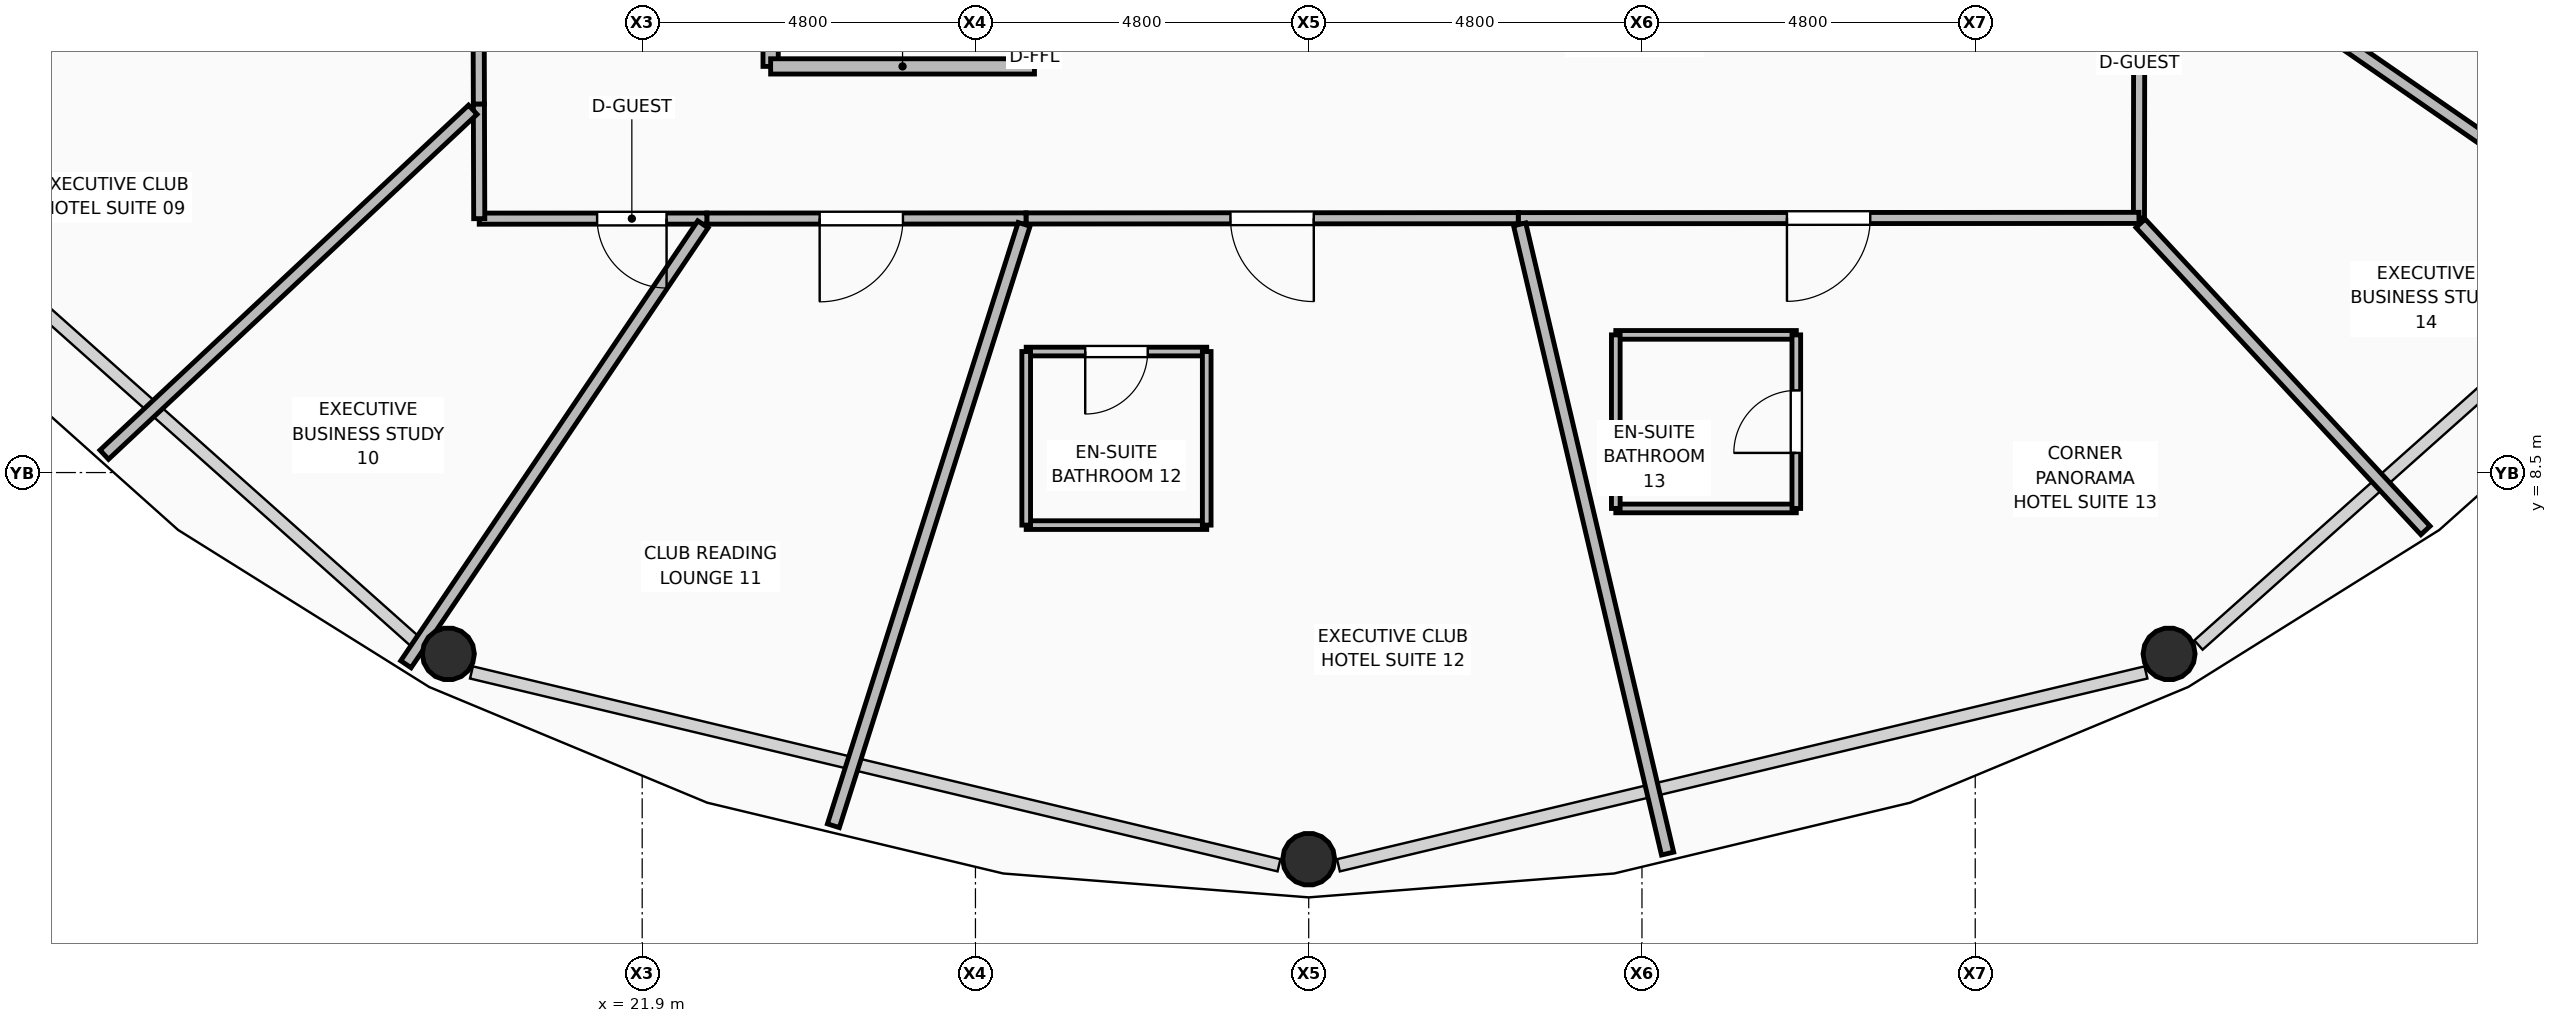
"""IFC4 building model, lengths in metres.
Left out: names, types, materials, properties, quantities, classifications, styles, units other than length and angle.
Written with IfcOpenShell. Run it as: python <this file> out.ifc"""

import sys

from ifc_helpers import new_model, si_unit, direction, frame, frame_2d, origin, origin_2d, place, context, subcontext, project, spatial, rectangle, hollow_circle, extrude, element, fill, save


model = new_model("IFC4")
c1 = context("Model", 3, precision=1e-05, world=origin(), true_north=direction((0.0, 1.0)))
c2 = subcontext(c1, "Body", "Model", "MODEL_VIEW")
j1 = project(units=[si_unit("LENGTHUNIT", "METRE"), si_unit("PLANEANGLEUNIT", "RADIAN")], contexts=[c1])
p1 = place(None, origin())
s1 = spatial("IfcSite", under=j1, at=p1, CompositionType="ELEMENT")
p2 = place(p1, origin())
s2 = spatial("IfcBuilding", under=s1, at=p2, CompositionType="ELEMENT")
p3 = place(p2, frame((0.0, 0.0, 149.7)))
s3 = spatial("IfcBuildingStorey", under=s2, at=p3, CompositionType="ELEMENT", Elevation=149.7)
for number, where, z_axis, x_axis in (
    (1, (19.108, 5.888, 0.0), (0.0, 0.0, 1.0), (1.0, 0.0, 0.0)),
    (2, (31.5, 2.931, 0.0), (0.0, 0.0, 1.0), (1.0, 0.0, 0.0)),
    (3, (43.892, 5.888, 0.0), (0.0, 0.0, 1.0), (1.0, 0.0, 0.0)),
):
    element("IfcColumn", number, at=place(p3, frame(where, z_axis=z_axis, x_axis=x_axis)), inside=s3, PredefinedType="COLUMN", context=c2, shape_type="SweptSolid", body=[
        extrude(hollow_circle(Radius=0.375, WallThickness=0.035, at=origin_2d()), origin(), (0.0, 0.0, 1.0), 3.57),
    ])
p4 = place(p3, frame((23.75, 14.35, 0.0), z_axis=(0.0, 0.0, 1.0), x_axis=(0.0, 1.0, 0.0)))
e4 = element("IfcWall", 4, at=p4, inside=s3, PredefinedType="PARTITIONING", context=c2, shape_type="SweptSolid", body=[
    extrude(rectangle(XDim=3.45, YDim=0.22, at=frame_2d((1.725, 0.0))), origin(), (0.0, 0.0, 1.0), 3.006),
])
p5 = place(p3, frame((23.75, 14.35, 0.0), z_axis=(0.0, 0.0, 1.0), x_axis=(1.0, 0.0, 0.0)))
e5 = element("IfcWall", 5, at=p5, inside=s3, PredefinedType="PARTITIONING", context=c2, shape_type="SweptSolid", body=[
    extrude(rectangle(XDim=3.8, YDim=0.22, at=frame_2d((1.9, 0.0))), origin(), (0.0, 0.0, 1.0), 3.55),
])
p6 = place(p3, frame((27.55, 14.35, 0.0), z_axis=(0.0, 0.0, 1.0), x_axis=(0.0, 1.0, 0.0)))
e6 = element("IfcWall", 6, at=p6, inside=s3, PredefinedType="PARTITIONING", context=c2, shape_type="SweptSolid", body=[
    extrude(rectangle(XDim=3.45, YDim=0.22, at=frame_2d((1.725, 0.0))), origin(), (0.0, 0.0, 1.0), 3.006),
])
p7 = place(p6, frame((1.175, 0.0, 0.0)))
e7 = element("IfcOpeningElement", 7, at=p7, cuts=e6, PredefinedType="OPENING", context=c2, shape_type="SweptSolid", body=[
    extrude(rectangle(XDim=1.1, YDim=2.1, at=frame_2d((0.55, 1.05))), frame((0.0, 0.12, 0.0), z_axis=(0.0, -1.0, 0.0), x_axis=(1.0, 0.0, 0.0)), (0.0, 0.0, 1.0), 0.24),
])
p8 = place(p3, frame((43.464, 16.729, 0.0), z_axis=(0.0, 0.0, 1.0), x_axis=(-0.001338185291, -0.99999910463, 0.0)))
e8 = element("IfcWall", 8, at=p8, inside=s3, PredefinedType="PARTITIONING", context=c2, shape_type="SweptSolid", body=[
    extrude(rectangle(XDim=4.561, YDim=0.16, at=frame_2d((2.281, 0.0))), origin(), (0.0, 0.0, 1.0), 3.55),
])
p9 = place(p8, frame((0.602, 0.0, 0.0)))
e9 = element("IfcOpeningElement", 9, at=p9, cuts=e8, PredefinedType="OPENING", context=c2, shape_type="SweptSolid", body=[
    extrude(rectangle(XDim=1.0, YDim=2.1, at=frame_2d((0.5, 1.05))), frame((0.0, 0.09, 0.0), z_axis=(0.0, -1.0, 0.0), x_axis=(1.0, 0.0, 0.0)), (0.0, 0.0, 1.0), 0.18),
])
p10 = place(p3, frame((43.458, 12.168, 0.0), z_axis=(0.0, 0.0, 1.0), x_axis=(-0.99999990454, -0.000436943538, 0.0)))
e10 = element("IfcWall", 10, at=p10, inside=s3, PredefinedType="PARTITIONING", context=c2, shape_type="SweptSolid", body=[
    extrude(rectangle(XDim=8.94, YDim=0.16, at=frame_2d((4.47, 0.0))), origin(), (0.0, 0.0, 1.0), 3.006),
])
p11 = place(p10, frame((3.87, 0.0, 0.0)))
e11 = element("IfcOpeningElement", 11, at=p11, cuts=e10, PredefinedType="OPENING", context=c2, shape_type="SweptSolid", body=[
    extrude(rectangle(XDim=1.2, YDim=2.1, at=frame_2d((0.6, 1.05))), frame((0.0, 0.09, 0.0), z_axis=(0.0, -1.0, 0.0), x_axis=(1.0, 0.0, 0.0)), (0.0, 0.0, 1.0), 0.18),
])
p12 = place(p3, frame((34.518, 12.164, 0.0), z_axis=(0.0, 0.0, 1.0), x_axis=(-0.999999828666, -0.000585379191, 0.0)))
e12 = element("IfcWall", 12, at=p12, inside=s3, PredefinedType="PARTITIONING", context=c2, shape_type="SweptSolid", body=[
    extrude(rectangle(XDim=7.09, YDim=0.16, at=frame_2d((3.545, 0.0))), origin(), (0.0, 0.0, 1.0), 3.006),
])
p13 = place(p12, frame((2.945, 0.0, 0.0)))
e13 = element("IfcOpeningElement", 13, at=p13, cuts=e12, PredefinedType="OPENING", context=c2, shape_type="SweptSolid", body=[
    extrude(rectangle(XDim=1.2, YDim=2.1, at=frame_2d((0.6, 1.05))), frame((0.0, 0.09, 0.0), z_axis=(0.0, -1.0, 0.0), x_axis=(1.0, 0.0, 0.0)), (0.0, 0.0, 1.0), 0.18),
])
p14 = place(p3, frame((27.428, 12.16, 0.0), z_axis=(0.0, 0.0, 1.0), x_axis=(-0.99999990974, -0.000424876482, 0.0)))
e14 = element("IfcWall", 14, at=p14, inside=s3, PredefinedType="PARTITIONING", context=c2, shape_type="SweptSolid", body=[
    extrude(rectangle(XDim=4.597, YDim=0.16, at=frame_2d((2.298, 0.0))), origin(), (0.0, 0.0, 1.0), 3.55),
])
p15 = place(p14, frame((1.772, 0.0, 0.0)))
e15 = element("IfcOpeningElement", 15, at=p15, cuts=e14, PredefinedType="OPENING", context=c2, shape_type="SweptSolid", body=[
    extrude(rectangle(XDim=1.2, YDim=2.1, at=frame_2d((0.6, 1.05))), frame((0.0, 0.09, 0.0), z_axis=(0.0, -1.0, 0.0), x_axis=(1.0, 0.0, 0.0)), (0.0, 0.0, 1.0), 0.18),
])
p16 = place(p3, frame((22.831, 12.158, 0.0), z_axis=(0.0, 0.0, 1.0), x_axis=(-0.999999955626, -0.000297907189, 0.0)))
e16 = element("IfcWall", 16, at=p16, inside=s3, PredefinedType="PARTITIONING", context=c2, shape_type="SweptSolid", body=[
    extrude(rectangle(XDim=3.278, YDim=0.16, at=frame_2d((1.639, 0.0))), origin(), (0.0, 0.0, 1.0), 3.006),
])
p17 = place(p16, frame((0.58, 0.0, 0.0)))
e17 = element("IfcOpeningElement", 17, at=p17, cuts=e16, PredefinedType="OPENING", context=c2, shape_type="SweptSolid", body=[
    extrude(rectangle(XDim=1.0, YDim=2.1, at=frame_2d((0.5, 1.05))), frame((0.0, 0.09, 0.0), z_axis=(0.0, -1.0, 0.0), x_axis=(1.0, 0.0, 0.0)), (0.0, 0.0, 1.0), 0.18),
])
p18 = place(p3, frame((19.553, 12.157, 0.0), z_axis=(0.0, 0.0, 1.0), x_axis=(-0.002955506524, 0.999995632481, 0.0)))
e18 = element("IfcWall", 18, at=p18, inside=s3, PredefinedType="PARTITIONING", context=c2, shape_type="SweptSolid", body=[
    extrude(rectangle(XDim=1.652, YDim=0.16, at=frame_2d((0.826, 0.0))), origin(), (0.0, 0.0, 1.0), 3.55),
])
p19 = place(p3, frame((19.548, 13.809, 0.0), z_axis=(0.0, 0.0, 1.0), x_axis=(-0.00317608091, 0.999994956242, 0.0)))
e19 = element("IfcWall", 19, at=p19, inside=s3, PredefinedType="PARTITIONING", context=c2, shape_type="SweptSolid", body=[
    extrude(rectangle(XDim=4.151, YDim=0.16, at=frame_2d((2.075, 0.0))), origin(), (0.0, 0.0, 1.0), 3.006),
])
p20 = place(p19, frame((2.791, 0.0, 0.0)))
e20 = element("IfcOpeningElement", 20, at=p20, cuts=e19, PredefinedType="OPENING", context=c2, shape_type="SweptSolid", body=[
    extrude(rectangle(XDim=1.2, YDim=2.1, at=frame_2d((0.6, 1.05))), frame((0.0, 0.09, 0.0), z_axis=(0.0, -1.0, 0.0), x_axis=(1.0, 0.0, 0.0)), (0.0, 0.0, 1.0), 0.18),
])
p21 = place(p3, frame((19.46, 13.726, 0.0), z_axis=(0.0, 0.0, 1.0), x_axis=(-0.730026032341, -0.683419338404, 0.0)))
e21 = element("IfcWall", 21, at=p21, inside=s3, PredefinedType="PARTITIONING", context=c2, shape_type="SweptSolid", body=[
    extrude(rectangle(XDim=7.271, YDim=0.18, at=frame_2d((3.635, 0.0))), origin(), (0.0, 0.0, 1.0), 2.852),
])
p22 = place(p3, frame((22.775, 12.075, 0.0), z_axis=(0.0, 0.0, 1.0), x_axis=(-0.559569383681, -0.828783509034, 0.0)))
e22 = element("IfcWall", 22, at=p22, inside=s3, PredefinedType="PARTITIONING", context=c2, shape_type="SweptSolid", body=[
    extrude(rectangle(XDim=7.645, YDim=0.18, at=frame_2d((3.822, 0.0))), origin(), (0.0, 0.0, 1.0), 2.852),
])
p23 = place(p3, frame((27.401, 12.075, 0.0), z_axis=(0.0, 0.0, 1.0), x_axis=(-0.302281968235, -0.953218553995, 0.0)))
e23 = element("IfcWall", 23, at=p23, inside=s3, PredefinedType="PARTITIONING", context=c2, shape_type="SweptSolid", body=[
    extrude(rectangle(XDim=9.087, YDim=0.18, at=frame_2d((4.543, 0.0))), origin(), (0.0, 0.0, 1.0), 2.852),
])
p24 = place(p3, frame((34.538, 12.075, 0.0), z_axis=(0.0, 0.0, 1.0), x_axis=(0.228875629266, -0.973455672503, 0.0)))
e24 = element("IfcWall", 24, at=p24, inside=s3, PredefinedType="PARTITIONING", context=c2, shape_type="SweptSolid", body=[
    extrude(rectangle(XDim=9.31, YDim=0.18, at=frame_2d((4.655, 0.0))), origin(), (0.0, 0.0, 1.0), 2.852),
])
p25 = place(p3, frame((43.481, 12.09, 0.0), z_axis=(0.0, 0.0, 1.0), x_axis=(0.680170141703, -0.73305428062, 0.0)))
e25 = element("IfcWall", 25, at=p25, inside=s3, PredefinedType="PARTITIONING", context=c2, shape_type="SweptSolid", body=[
    extrude(rectangle(XDim=6.034, YDim=0.18, at=frame_2d((3.017, 0.0))), origin(), (0.0, 0.0, 1.0), 2.852),
])
p26 = place(p3, frame((43.54, 16.677, 0.0), z_axis=(0.0, 0.0, 1.0), x_axis=(0.822542691302, -0.568703368186, 0.0)))
e26 = element("IfcWall", 26, at=p26, inside=s3, PredefinedType="PARTITIONING", context=c2, shape_type="SweptSolid", body=[
    extrude(rectangle(XDim=9.55, YDim=0.18, at=frame_2d((4.775, 0.0))), origin(), (0.0, 0.0, 1.0), 2.852),
])
p27 = place(p3, frame((27.431, 7.743, 0.0), z_axis=(0.0, 0.0, 1.0), x_axis=(1.0, 0.0, 0.0)))
e27 = element("IfcWall", 27, at=p27, inside=s3, PredefinedType="PARTITIONING", context=c2, shape_type="SweptSolid", body=[
    extrude(rectangle(XDim=2.6, YDim=0.125, at=frame_2d((1.3, 0.0))), origin(), (0.0, 0.0, 1.0), 3.55),
])
p28 = place(p3, frame((27.431, 10.243, 0.0), z_axis=(0.0, 0.0, 1.0), x_axis=(1.0, 0.0, 0.0)))
e28 = element("IfcWall", 28, at=p28, inside=s3, PredefinedType="PARTITIONING", context=c2, shape_type="SweptSolid", body=[
    extrude(rectangle(XDim=2.6, YDim=0.125, at=frame_2d((1.3, 0.0))), origin(), (0.0, 0.0, 1.0), 3.55),
])
p29 = place(p28, frame((0.85, 0.0, 0.0)))
e29 = element("IfcOpeningElement", 29, at=p29, cuts=e28, PredefinedType="OPENING", context=c2, shape_type="SweptSolid", body=[
    extrude(rectangle(XDim=0.9, YDim=2.1, at=frame_2d((0.45, 1.05))), frame((0.0, 0.073, 0.0), z_axis=(0.0, -1.0, 0.0), x_axis=(1.0, 0.0, 0.0)), (0.0, 0.0, 1.0), 0.145),
])
for number, where, z_axis, x_axis in (
    (30, (27.431, 7.743, 0.0), (0.0, 0.0, 1.0), (0.0, 1.0, 0.0)),
    (31, (30.031, 7.743, 0.0), (0.0, 0.0, 1.0), (0.0, 1.0, 0.0)),
):
    element("IfcWall", number, at=place(p3, frame(where, z_axis=z_axis, x_axis=x_axis)), inside=s3, PredefinedType="PARTITIONING", context=c2, shape_type="SweptSolid", body=[
        extrude(rectangle(XDim=2.5, YDim=0.125, at=frame_2d((1.25, 0.0))), origin(), (0.0, 0.0, 1.0), 3.55),
    ])
for number, where, z_axis, x_axis in (
    (32, (35.923, 7.983, 0.0), (0.0, 0.0, 1.0), (1.0, 0.0, 0.0)),
    (33, (35.923, 10.483, 0.0), (0.0, 0.0, 1.0), (1.0, 0.0, 0.0)),
):
    element("IfcWall", number, at=place(p3, frame(where, z_axis=z_axis, x_axis=x_axis)), inside=s3, PredefinedType="PARTITIONING", context=c2, shape_type="SweptSolid", body=[
        extrude(rectangle(XDim=2.6, YDim=0.125, at=frame_2d((1.3, 0.0))), origin(), (0.0, 0.0, 1.0), 3.55),
    ])
p30 = place(p3, frame((35.923, 7.983, 0.0), z_axis=(0.0, 0.0, 1.0), x_axis=(0.0, 1.0, 0.0)))
e34 = element("IfcWall", 34, at=p30, inside=s3, PredefinedType="PARTITIONING", context=c2, shape_type="SweptSolid", body=[
    extrude(rectangle(XDim=2.5, YDim=0.125, at=frame_2d((1.25, 0.0))), origin(), (0.0, 0.0, 1.0), 3.55),
])
p31 = place(p3, frame((38.523, 7.983, 0.0), z_axis=(0.0, 0.0, 1.0), x_axis=(0.0, 1.0, 0.0)))
e35 = element("IfcWall", 35, at=p31, inside=s3, PredefinedType="PARTITIONING", context=c2, shape_type="SweptSolid", body=[
    extrude(rectangle(XDim=2.5, YDim=0.125, at=frame_2d((1.25, 0.0))), origin(), (0.0, 0.0, 1.0), 3.55),
])
p32 = place(p31, frame((0.8, 0.0, 0.0)))
e36 = element("IfcOpeningElement", 36, at=p32, cuts=e35, PredefinedType="OPENING", context=c2, shape_type="SweptSolid", body=[
    extrude(rectangle(XDim=0.9, YDim=2.1, at=frame_2d((0.45, 1.05))), frame((0.0, 0.073, 0.0), z_axis=(0.0, -1.0, 0.0), x_axis=(1.0, 0.0, 0.0)), (0.0, 0.0, 1.0), 0.145),
])
p33 = place(p17, origin())
e37 = element("IfcDoor", 37, at=p33, inside=s3, OperationType="SINGLE_SWING_LEFT", PredefinedType="DOOR", context=c2, shape_type="SweptSolid", body=[
    extrude(rectangle(XDim=1.0, YDim=2.1, at=frame_2d((0.5, 1.05))), frame((0.0, 0.025, 0.0), z_axis=(0.0, -1.0, 0.0), x_axis=(1.0, 0.0, 0.0)), (0.0, 0.0, 1.0), 0.05),
])
fill(e17, e37)
p34 = place(p15, origin())
e38 = element("IfcDoor", 38, at=p34, inside=s3, OperationType="SINGLE_SWING_RIGHT", PredefinedType="DOOR", context=c2, shape_type="SweptSolid", body=[
    extrude(rectangle(XDim=1.2, YDim=2.1, at=frame_2d((0.6, 1.05))), frame((0.0, 0.025, 0.0), z_axis=(0.0, -1.0, 0.0), x_axis=(1.0, 0.0, 0.0)), (0.0, 0.0, 1.0), 0.05),
])
fill(e15, e38)
p35 = place(p29, frame((0.9, 0.0, 0.0), z_axis=(0.0, 0.0, 1.0), x_axis=(-1.0, 0.0, 0.0)))
e39 = element("IfcDoor", 39, at=p35, inside=s3, OperationType="SINGLE_SWING_RIGHT", PredefinedType="DOOR", context=c2, shape_type="SweptSolid", body=[
    extrude(rectangle(XDim=0.9, YDim=2.1, at=frame_2d((0.45, 1.05))), frame((0.0, 0.025, 0.0), z_axis=(0.0, -1.0, 0.0), x_axis=(1.0, 0.0, 0.0)), (0.0, 0.0, 1.0), 0.05),
])
fill(e29, e39)
p36 = place(p13, origin())
e40 = element("IfcDoor", 40, at=p36, inside=s3, OperationType="SINGLE_SWING_LEFT", PredefinedType="DOOR", context=c2, shape_type="SweptSolid", body=[
    extrude(rectangle(XDim=1.2, YDim=2.1, at=frame_2d((0.6, 1.05))), frame((0.0, 0.025, 0.0), z_axis=(0.0, -1.0, 0.0), x_axis=(1.0, 0.0, 0.0)), (0.0, 0.0, 1.0), 0.05),
])
fill(e13, e40)
p37 = place(p32, origin())
e41 = element("IfcDoor", 41, at=p37, inside=s3, OperationType="SINGLE_SWING_LEFT", PredefinedType="DOOR", context=c2, shape_type="SweptSolid", body=[
    extrude(rectangle(XDim=0.9, YDim=2.1, at=frame_2d((0.45, 1.05))), frame((0.0, 0.025, 0.0), z_axis=(0.0, -1.0, 0.0), x_axis=(1.0, 0.0, 0.0)), (0.0, 0.0, 1.0), 0.05),
])
fill(e36, e41)
p38 = place(p11, origin())
e42 = element("IfcDoor", 42, at=p38, inside=s3, OperationType="SINGLE_SWING_RIGHT", PredefinedType="DOOR", context=c2, shape_type="SweptSolid", body=[
    extrude(rectangle(XDim=1.2, YDim=2.1, at=frame_2d((0.6, 1.05))), frame((0.0, 0.025, 0.0), z_axis=(0.0, -1.0, 0.0), x_axis=(1.0, 0.0, 0.0)), (0.0, 0.0, 1.0), 0.05),
])
fill(e11, e42)
save(model, sys.argv[1])
